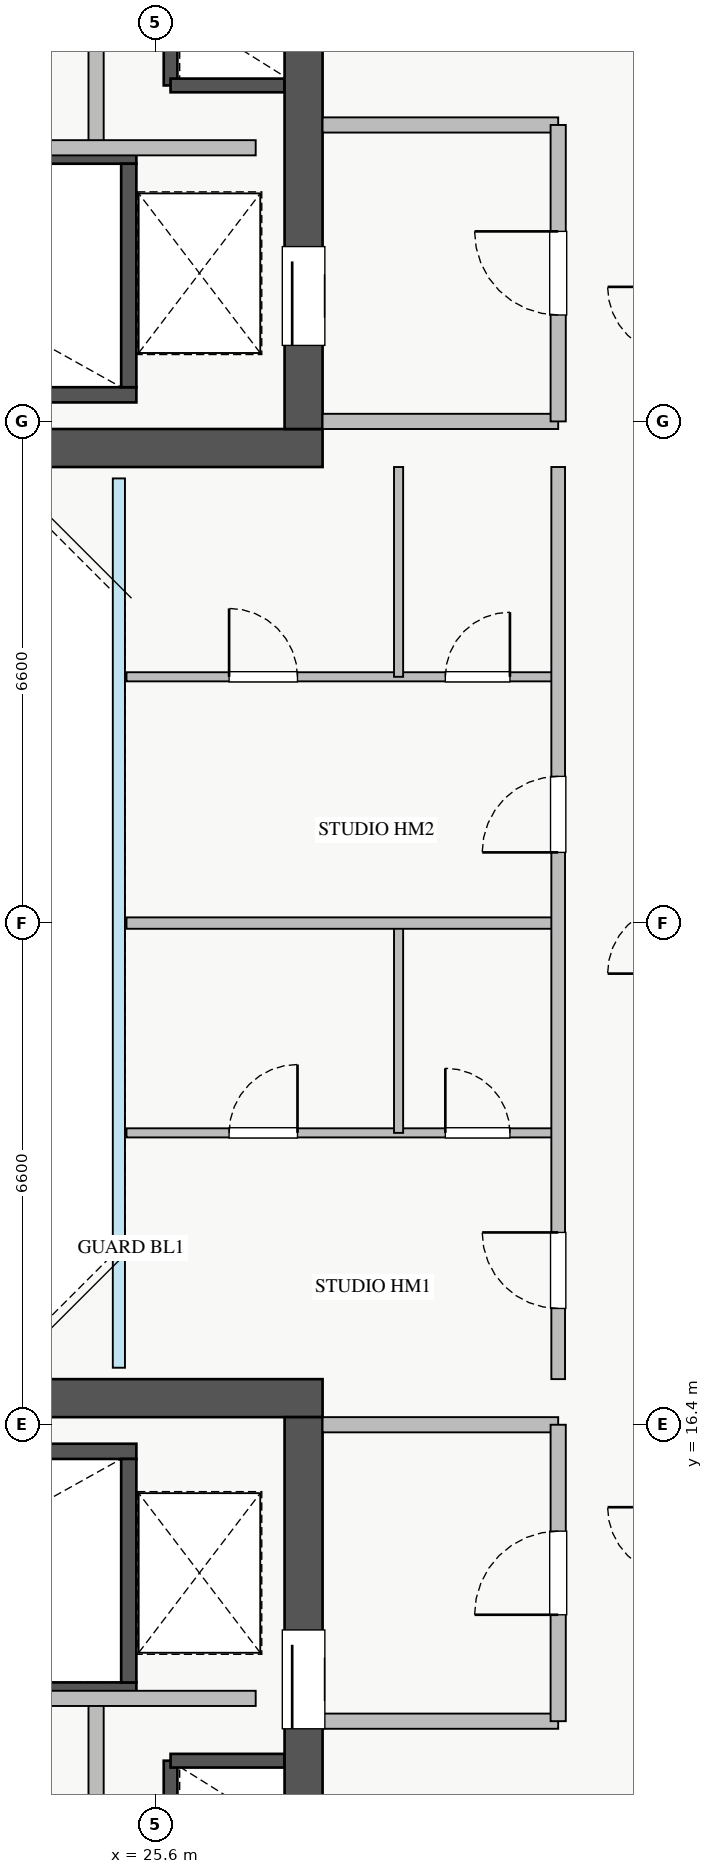
"""IFC4 building model, lengths in metres.
Left out: names, types, materials, properties, quantities, classifications, styles, units other than length and angle.
Written with IfcOpenShell. Run it as: python <this file> out.ifc"""

import sys

from ifc_helpers import new_model, si_unit, direction, frame, frame_2d, origin, place, context, subcontext, project, spatial, rectangle, extrude, source, transform, mapped, element, fill, save


model = new_model("IFC4")
c1 = context("Model", 3, precision=1e-05, world=origin(), true_north=direction((0.0, 1.0)))
c2 = subcontext(c1, "Body", "Model", "MODEL_VIEW")
j1 = project(units=[si_unit("LENGTHUNIT", "METRE"), si_unit("PLANEANGLEUNIT", "RADIAN")], contexts=[c1])
p1 = place(None, origin())
s1 = spatial("IfcSite", under=j1, at=p1, CompositionType="ELEMENT")
p2 = place(p1, origin())
s2 = spatial("IfcBuilding", under=s1, at=p2, CompositionType="ELEMENT")
p3 = place(p2, frame((0.0, 0.0, 200.25)))
s3 = spatial("IfcBuildingStorey", under=s2, at=p3, CompositionType="ELEMENT", Elevation=200.25)
p4 = place(p3, frame((25.8, 34.02, 0.0), z_axis=(0.0, 0.0, 1.0), x_axis=(0.0, 1.0, 0.0)))
e1 = element("IfcWall", 1, at=p4, inside=s3, PredefinedType="SHEAR", context=c2, shape_type="SweptSolid", body=[
    extrude(rectangle(XDim=1.06, YDim=0.18, at=frame_2d((0.53, 0.0))), origin(), (0.0, 0.0, 1.0), 3.07),
])
p5 = place(p3, frame((25.8, 34.02, 0.0), z_axis=(0.0, 0.0, 1.0), x_axis=(1.0, 0.0, 0.0)))
e2 = element("IfcWall", 2, at=p5, inside=s3, PredefinedType="SHEAR", context=c2, shape_type="SweptSolid", body=[
    extrude(rectangle(XDim=1.5, YDim=0.18, at=frame_2d((0.75, 0.0))), origin(), (0.0, 0.0, 1.0), 3.07),
])
p6 = place(p3, frame((25.8, 10.92, 0.0), z_axis=(0.0, 0.0, 1.0), x_axis=(0.0, 1.0, 0.0)))
e3 = element("IfcWall", 3, at=p6, inside=s3, PredefinedType="SHEAR", context=c2, shape_type="SweptSolid", body=[
    extrude(rectangle(XDim=1.06, YDim=0.18, at=frame_2d((0.53, 0.0))), origin(), (0.0, 0.0, 1.0), 3.07),
])
p7 = place(p3, frame((25.8, 11.98, 0.0), z_axis=(0.0, 0.0, 1.0), x_axis=(1.0, 0.0, 0.0)))
e4 = element("IfcWall", 4, at=p7, inside=s3, PredefinedType="SHEAR", context=c2, shape_type="SweptSolid", body=[
    extrude(rectangle(XDim=1.5, YDim=0.18, at=frame_2d((0.75, 0.0))), origin(), (0.0, 0.0, 1.0), 3.07),
])
p8 = place(p3, frame((18.2, 29.95, 0.0), z_axis=(0.0, 0.0, 1.0), x_axis=(1.0, 0.0, 0.0)))
e5 = element("IfcWall", 5, at=p8, inside=s3, PredefinedType="SHEAR", context=c2, shape_type="SweptSolid", body=[
    extrude(rectangle(XDim=7.15, YDim=0.2, at=frame_2d((3.575, 0.0))), origin(), (0.0, 0.0, 1.0), 3.25),
])
p9 = place(p3, frame((18.2, 33.09, 0.0), z_axis=(0.0, 0.0, 1.0), x_axis=(1.0, 0.0, 0.0)))
e6 = element("IfcWall", 6, at=p9, inside=s3, PredefinedType="SHEAR", context=c2, shape_type="SweptSolid", body=[
    extrude(rectangle(XDim=7.15, YDim=0.2, at=frame_2d((3.575, 0.0))), origin(), (0.0, 0.0, 1.0), 3.25),
])
p10 = place(p9, frame((0.35, 0.0, 0.0)))
e7 = element("IfcOpeningElement", 7, at=p10, cuts=e6, PredefinedType="OPENING", context=c2, shape_type="SweptSolid", body=[
    extrude(rectangle(XDim=1.1, YDim=2.05, at=frame_2d((0.55, 1.025))), frame((0.0, 0.11, 0.0), z_axis=(0.0, -1.0, 0.0), x_axis=(1.0, 0.0, 0.0)), (0.0, 0.0, 1.0), 0.22),
])
p11 = place(p3, frame((25.25, 30.05, 0.0), z_axis=(0.0, 0.0, 1.0), x_axis=(0.0, 1.0, 0.0)))
e8 = element("IfcWall", 8, at=p11, inside=s3, PredefinedType="SHEAR", context=c2, shape_type="SweptSolid", body=[
    extrude(rectangle(XDim=2.94, YDim=0.2, at=frame_2d((1.47, 0.0))), origin(), (0.0, 0.0, 1.0), 3.25),
])
p12 = place(p3, frame((18.2, 12.91, 0.0), z_axis=(0.0, 0.0, 1.0), x_axis=(1.0, 0.0, 0.0)))
e9 = element("IfcWall", 9, at=p12, inside=s3, PredefinedType="SHEAR", context=c2, shape_type="SweptSolid", body=[
    extrude(rectangle(XDim=7.15, YDim=0.2, at=frame_2d((3.575, 0.0))), origin(), (0.0, 0.0, 1.0), 3.25),
])
p13 = place(p12, frame((0.35, 0.0, 0.0)))
e10 = element("IfcOpeningElement", 10, at=p13, cuts=e9, PredefinedType="OPENING", context=c2, shape_type="SweptSolid", body=[
    extrude(rectangle(XDim=1.1, YDim=2.05, at=frame_2d((0.55, 1.025))), frame((0.0, 0.11, 0.0), z_axis=(0.0, -1.0, 0.0), x_axis=(1.0, 0.0, 0.0)), (0.0, 0.0, 1.0), 0.22),
])
p14 = place(p3, frame((18.2, 16.05, 0.0), z_axis=(0.0, 0.0, 1.0), x_axis=(1.0, 0.0, 0.0)))
e11 = element("IfcWall", 11, at=p14, inside=s3, PredefinedType="SHEAR", context=c2, shape_type="SweptSolid", body=[
    extrude(rectangle(XDim=7.15, YDim=0.2, at=frame_2d((3.575, 0.0))), origin(), (0.0, 0.0, 1.0), 3.25),
])
p15 = place(p3, frame((25.25, 13.01, 0.0), z_axis=(0.0, 0.0, 1.0), x_axis=(0.0, 1.0, 0.0)))
e12 = element("IfcWall", 12, at=p15, inside=s3, PredefinedType="SHEAR", context=c2, shape_type="SweptSolid", body=[
    extrude(rectangle(XDim=2.94, YDim=0.2, at=frame_2d((1.47, 0.0))), origin(), (0.0, 0.0, 1.0), 3.25),
])
p16 = place(p3, frame((10.2, 29.25, 0.0), z_axis=(0.0, 0.0, 1.0), x_axis=(1.0, 0.0, 0.0)))
e13 = element("IfcWall", 13, at=p16, inside=s3, PredefinedType="SHEAR", context=c2, shape_type="SweptSolid", body=[
    extrude(rectangle(XDim=17.6, YDim=0.5, at=frame_2d((8.8, 0.0))), origin(), (0.0, 0.0, 1.0), 3.25),
])
p17 = place(p3, frame((27.55, 29.5, 0.0), z_axis=(0.0, 0.0, 1.0), x_axis=(0.0, 1.0, 0.0)))
e14 = element("IfcWall", 14, at=p17, inside=s3, PredefinedType="SHEAR", context=c2, shape_type="SweptSolid", body=[
    extrude(rectangle(XDim=6.2, YDim=0.5, at=frame_2d((3.1, 0.0))), origin(), (0.0, 0.0, 1.0), 3.25),
])
p18 = place(p17, frame((1.1, 0.0, 0.0)))
e15 = element("IfcOpeningElement", 15, at=p18, cuts=e14, PredefinedType="OPENING", context=c2, shape_type="SweptSolid", body=[
    extrude(rectangle(XDim=1.3, YDim=2.05, at=frame_2d((0.65, 1.025))), frame((0.0, 0.26, 0.0), z_axis=(0.0, -1.0, 0.0), x_axis=(1.0, 0.0, 0.0)), (0.0, 0.0, 1.0), 0.52),
])
p19 = place(p3, frame((10.2, 16.75, 0.0), z_axis=(0.0, 0.0, 1.0), x_axis=(1.0, 0.0, 0.0)))
e16 = element("IfcWall", 16, at=p19, inside=s3, PredefinedType="SHEAR", context=c2, shape_type="SweptSolid", body=[
    extrude(rectangle(XDim=17.6, YDim=0.5, at=frame_2d((8.8, 0.0))), origin(), (0.0, 0.0, 1.0), 3.25),
])
p20 = place(p3, frame((27.55, 10.3, 0.0), z_axis=(0.0, 0.0, 1.0), x_axis=(0.0, 1.0, 0.0)))
e17 = element("IfcWall", 17, at=p20, inside=s3, PredefinedType="SHEAR", context=c2, shape_type="SweptSolid", body=[
    extrude(rectangle(XDim=6.2, YDim=0.5, at=frame_2d((3.1, 0.0))), origin(), (0.0, 0.0, 1.0), 3.25),
])
p21 = place(p20, frame((2.1, 0.0, 0.0)))
e18 = element("IfcOpeningElement", 18, at=p21, cuts=e17, PredefinedType="OPENING", context=c2, shape_type="SweptSolid", body=[
    extrude(rectangle(XDim=1.3, YDim=2.05, at=frame_2d((0.65, 1.025))), frame((0.0, 0.26, 0.0), z_axis=(0.0, -1.0, 0.0), x_axis=(1.0, 0.0, 0.0)), (0.0, 0.0, 1.0), 0.52),
])
p22 = place(p3, frame((27.8, 29.6, 0.0), z_axis=(0.0, 0.0, 1.0), x_axis=(1.0, 0.0, 0.0)))
e19 = element("IfcWall", 19, at=p22, inside=s3, PredefinedType="PARTITIONING", context=c2, shape_type="SweptSolid", body=[
    extrude(rectangle(XDim=3.1, YDim=0.2, at=frame_2d((1.55, 0.0))), origin(), (0.0, 0.0, 1.0), 3.07),
])
p23 = place(p3, frame((27.8, 33.5, 0.0), z_axis=(0.0, 0.0, 1.0), x_axis=(1.0, 0.0, 0.0)))
e20 = element("IfcWall", 20, at=p23, inside=s3, PredefinedType="PARTITIONING", context=c2, shape_type="SweptSolid", body=[
    extrude(rectangle(XDim=3.1, YDim=0.2, at=frame_2d((1.55, 0.0))), origin(), (0.0, 0.0, 1.0), 2.265),
])
p24 = place(p3, frame((30.9, 29.6, 0.0), z_axis=(0.0, 0.0, 1.0), x_axis=(0.0, 1.0, 0.0)))
e21 = element("IfcWall", 21, at=p24, inside=s3, PredefinedType="PARTITIONING", context=c2, shape_type="SweptSolid", body=[
    extrude(rectangle(XDim=3.9, YDim=0.2, at=frame_2d((1.95, 0.0))), origin(), (0.0, 0.0, 1.0), 3.07),
])
p25 = place(p24, frame((1.4, 0.0, 0.0)))
e22 = element("IfcOpeningElement", 22, at=p25, cuts=e21, PredefinedType="OPENING", context=c2, shape_type="SweptSolid", body=[
    extrude(rectangle(XDim=1.1, YDim=2.05, at=frame_2d((0.55, 1.025))), frame((0.0, 0.11, 0.0), z_axis=(0.0, -1.0, 0.0), x_axis=(1.0, 0.0, 0.0)), (0.0, 0.0, 1.0), 0.22),
])
p26 = place(p3, frame((27.8, 16.4, 0.0), z_axis=(0.0, 0.0, 1.0), x_axis=(1.0, 0.0, 0.0)))
e23 = element("IfcWall", 23, at=p26, inside=s3, PredefinedType="PARTITIONING", context=c2, shape_type="SweptSolid", body=[
    extrude(rectangle(XDim=3.1, YDim=0.2, at=frame_2d((1.55, 0.0))), origin(), (0.0, 0.0, 1.0), 3.07),
])
p27 = place(p3, frame((27.8, 12.5, 0.0), z_axis=(0.0, 0.0, 1.0), x_axis=(1.0, 0.0, 0.0)))
e24 = element("IfcWall", 24, at=p27, inside=s3, PredefinedType="PARTITIONING", context=c2, shape_type="SweptSolid", body=[
    extrude(rectangle(XDim=3.1, YDim=0.2, at=frame_2d((1.55, 0.0))), origin(), (0.0, 0.0, 1.0), 2.265),
])
p28 = place(p3, frame((30.9, 12.5, 0.0), z_axis=(0.0, 0.0, 1.0), x_axis=(0.0, 1.0, 0.0)))
e25 = element("IfcWall", 25, at=p28, inside=s3, PredefinedType="PARTITIONING", context=c2, shape_type="SweptSolid", body=[
    extrude(rectangle(XDim=3.9, YDim=0.2, at=frame_2d((1.95, 0.0))), origin(), (0.0, 0.0, 1.0), 3.07),
])
p29 = place(p28, frame((1.4, 0.0, 0.0)))
e26 = element("IfcOpeningElement", 26, at=p29, cuts=e25, PredefinedType="OPENING", context=c2, shape_type="SweptSolid", body=[
    extrude(rectangle(XDim=1.1, YDim=2.05, at=frame_2d((0.55, 1.025))), frame((0.0, 0.11, 0.0), z_axis=(0.0, -1.0, 0.0), x_axis=(1.0, 0.0, 0.0)), (0.0, 0.0, 1.0), 0.22),
])
for number, where, z_axis, x_axis in (
    (27, (24.82, 33.2, 0.0), (0.0, 0.0, 1.0), (0.0, 1.0, 0.0)),
    (28, (24.82, 10.15, 0.0), (0.0, 0.0, 1.0), (0.0, 1.0, 0.0)),
):
    element("IfcWall", number, at=place(p3, frame(where, z_axis=z_axis, x_axis=x_axis)), inside=s3, PredefinedType="PARTITIONING", context=c2, shape_type="SweptSolid", body=[
        extrude(rectangle(XDim=2.65, YDim=0.2, at=frame_2d((1.325, 0.0))), origin(), (0.0, 0.0, 1.0), 3.07),
    ])
for number, where, z_axis, x_axis in (
    (29, (21.75, 33.2, 0.0), (0.0, 0.0, 1.0), (1.0, 0.0, 0.0)),
    (30, (21.75, 12.8, 0.0), (0.0, 0.0, 1.0), (1.0, 0.0, 0.0)),
):
    element("IfcWall", number, at=place(p3, frame(where, z_axis=z_axis, x_axis=x_axis)), inside=s3, PredefinedType="PARTITIONING", context=c2, shape_type="SweptSolid", body=[
        extrude(rectangle(XDim=5.17, YDim=0.2, at=frame_2d((2.585, 0.0))), origin(), (0.0, 0.0, 1.0), 3.07),
    ])
p30 = place(p3, frame((25.22, 20.24, 0.0), z_axis=(0.0, 0.0, 1.0), x_axis=(1.0, 0.0, 0.0)))
e31 = element("IfcWall", 31, at=p30, inside=s3, PredefinedType="PLUMBINGWALL", context=c2, shape_type="SweptSolid", body=[
    extrude(rectangle(XDim=5.68, YDim=0.12, at=frame_2d((2.84, 0.0))), origin(), (0.0, 0.0, 1.0), 2.675),
])
p31 = place(p30, frame((1.35, 0.0, 0.0)))
e32 = element("IfcOpeningElement", 32, at=p31, cuts=e31, PredefinedType="OPENING", context=c2, shape_type="SweptSolid", body=[
    extrude(rectangle(XDim=0.9, YDim=2.05, at=frame_2d((0.45, 1.025))), frame((0.0, 0.07, 0.0), z_axis=(0.0, -1.0, 0.0), x_axis=(1.0, 0.0, 0.0)), (0.0, 0.0, 1.0), 0.14),
])
p32 = place(p30, frame((4.195, 0.0, 0.0)))
e33 = element("IfcOpeningElement", 33, at=p32, cuts=e31, PredefinedType="OPENING", context=c2, shape_type="SweptSolid", body=[
    extrude(rectangle(XDim=0.85, YDim=2.05, at=frame_2d((0.425, 1.025))), frame((0.0, 0.07, 0.0), z_axis=(0.0, -1.0, 0.0), x_axis=(1.0, 0.0, 0.0)), (0.0, 0.0, 1.0), 0.14),
])
p33 = place(p3, frame((28.8, 20.24, 0.0), z_axis=(0.0, 0.0, 1.0), x_axis=(0.0, 1.0, 0.0)))
e34 = element("IfcWall", 34, at=p33, inside=s3, PredefinedType="PLUMBINGWALL", context=c2, shape_type="SweptSolid", body=[
    extrude(rectangle(XDim=2.76, YDim=0.12, at=frame_2d((1.38, 0.0))), origin(), (0.0, 0.0, 1.0), 3.07),
])
p34 = place(p3, frame((25.22, 26.24, 0.0), z_axis=(0.0, 0.0, 1.0), x_axis=(1.0, 0.0, 0.0)))
e35 = element("IfcWall", 35, at=p34, inside=s3, PredefinedType="PLUMBINGWALL", context=c2, shape_type="SweptSolid", body=[
    extrude(rectangle(XDim=5.68, YDim=0.12, at=frame_2d((2.84, 0.0))), origin(), (0.0, 0.0, 1.0), 2.675),
])
p35 = place(p34, frame((1.35, 0.0, 0.0)))
e36 = element("IfcOpeningElement", 36, at=p35, cuts=e35, PredefinedType="OPENING", context=c2, shape_type="SweptSolid", body=[
    extrude(rectangle(XDim=0.9, YDim=2.05, at=frame_2d((0.45, 1.025))), frame((0.0, 0.07, 0.0), z_axis=(0.0, -1.0, 0.0), x_axis=(1.0, 0.0, 0.0)), (0.0, 0.0, 1.0), 0.14),
])
p36 = place(p34, frame((4.195, 0.0, 0.0)))
e37 = element("IfcOpeningElement", 37, at=p36, cuts=e35, PredefinedType="OPENING", context=c2, shape_type="SweptSolid", body=[
    extrude(rectangle(XDim=0.85, YDim=2.05, at=frame_2d((0.425, 1.025))), frame((0.0, 0.07, 0.0), z_axis=(0.0, -1.0, 0.0), x_axis=(1.0, 0.0, 0.0)), (0.0, 0.0, 1.0), 0.14),
])
p37 = place(p3, frame((28.8, 26.24, 0.0), z_axis=(0.0, 0.0, 1.0), x_axis=(0.0, 1.0, 0.0)))
e38 = element("IfcWall", 38, at=p37, inside=s3, PredefinedType="PLUMBINGWALL", context=c2, shape_type="SweptSolid", body=[
    extrude(rectangle(XDim=2.76, YDim=0.12, at=frame_2d((1.38, 0.0))), origin(), (0.0, 0.0, 1.0), 3.07),
])
p38 = place(p3, frame((25.22, 23.0, 0.0), z_axis=(0.0, 0.0, 1.0), x_axis=(1.0, 0.0, 0.0)))
e39 = element("IfcWall", 39, at=p38, inside=s3, PredefinedType="PARTITIONING", context=c2, shape_type="SweptSolid", body=[
    extrude(rectangle(XDim=5.68, YDim=0.15, at=frame_2d((2.84, 0.0))), origin(), (0.0, 0.0, 1.0), 3.07),
])
p39 = place(p3, frame((30.9, 17.0, 0.0), z_axis=(0.0, 0.0, 1.0), x_axis=(0.0, 1.0, 0.0)))
e40 = element("IfcWall", 40, at=p39, inside=s3, PredefinedType="PARTITIONING", context=c2, shape_type="SweptSolid", body=[
    extrude(rectangle(XDim=12.0, YDim=0.18, at=frame_2d((6.0, 0.0))), origin(), (0.0, 0.0, 1.0), 3.07),
])
p40 = place(p39, frame((0.93, 0.0, 0.0)))
e41 = element("IfcOpeningElement", 41, at=p40, cuts=e40, PredefinedType="OPENING", context=c2, shape_type="SweptSolid", body=[
    extrude(rectangle(XDim=1.0, YDim=2.05, at=frame_2d((0.5, 1.025))), frame((0.0, 0.1, 0.0), z_axis=(0.0, -1.0, 0.0), x_axis=(1.0, 0.0, 0.0)), (0.0, 0.0, 1.0), 0.2),
])
p41 = place(p39, frame((6.93, 0.0, 0.0)))
e42 = element("IfcOpeningElement", 42, at=p41, cuts=e40, PredefinedType="OPENING", context=c2, shape_type="SweptSolid", body=[
    extrude(rectangle(XDim=1.0, YDim=2.05, at=frame_2d((0.5, 1.025))), frame((0.0, 0.1, 0.0), z_axis=(0.0, -1.0, 0.0), x_axis=(1.0, 0.0, 0.0)), (0.0, 0.0, 1.0), 0.2),
])
m1 = source(origin(), c2, "Body", "SweptSolid", [
    extrude(rectangle(XDim=1.3, YDim=2.05, at=frame_2d((0.65, 1.025))), frame((0.0, 0.025, 0.0), z_axis=(0.0, -1.0, 0.0), x_axis=(1.0, 0.0, 0.0)), (0.0, 0.0, 1.0), 0.05),
])
p42 = place(p18, origin())
e43 = element("IfcDoor", 43, at=p42, inside=s3, OperationType="SLIDING_TO_LEFT", PredefinedType="DOOR", context=c2, shape_type="MappedRepresentation", body=[
    mapped(m1, transform((0.0, 0.0, 0.0), x_axis=(1.0, 0.0, 0.0), y_axis=(0.0, 1.0, 0.0), z_axis=(0.0, 0.0, 1.0), scale=1.0)),
])
fill(e15, e43)
p43 = place(p21, origin())
e44 = element("IfcDoor", 44, at=p43, inside=s3, OperationType="SLIDING_TO_RIGHT", PredefinedType="DOOR", context=c2, shape_type="MappedRepresentation", body=[
    mapped(m1, transform((0.0, 0.0, 0.0), x_axis=(1.0, 0.0, 0.0), y_axis=(0.0, 1.0, 0.0), z_axis=(0.0, 0.0, 1.0), scale=1.0)),
])
fill(e18, e44)
m2 = source(origin(), c2, "Body", "SweptSolid", [
    extrude(rectangle(XDim=1.1, YDim=2.05, at=frame_2d((0.55, 1.025))), frame((0.0, 0.025, 0.0), z_axis=(0.0, -1.0, 0.0), x_axis=(1.0, 0.0, 0.0)), (0.0, 0.0, 1.0), 0.05),
])
p44 = place(p25, origin())
e45 = element("IfcDoor", 45, at=p44, inside=s3, OperationType="SINGLE_SWING_RIGHT", PredefinedType="DOOR", context=c2, shape_type="MappedRepresentation", body=[
    mapped(m2, transform((0.0, 0.0, 0.0), x_axis=(1.0, 0.0, 0.0), y_axis=(0.0, 1.0, 0.0), z_axis=(0.0, 0.0, 1.0), scale=1.0)),
])
fill(e22, e45)
p45 = place(p29, origin())
e46 = element("IfcDoor", 46, at=p45, inside=s3, OperationType="SINGLE_SWING_LEFT", PredefinedType="DOOR", context=c2, shape_type="MappedRepresentation", body=[
    mapped(m2, transform((0.0, 0.0, 0.0), x_axis=(1.0, 0.0, 0.0), y_axis=(0.0, 1.0, 0.0), z_axis=(0.0, 0.0, 1.0), scale=1.0)),
])
fill(e26, e46)
m3 = source(origin(), c2, "Body", "SweptSolid", [
    extrude(rectangle(XDim=0.9, YDim=2.05, at=frame_2d((0.45, 1.025))), frame((0.0, 0.025, 0.0), z_axis=(0.0, -1.0, 0.0), x_axis=(1.0, 0.0, 0.0)), (0.0, 0.0, 1.0), 0.05),
])
p46 = place(p31, origin())
e47 = element("IfcDoor", 47, at=p46, inside=s3, OperationType="SINGLE_SWING_RIGHT", PredefinedType="DOOR", context=c2, shape_type="MappedRepresentation", body=[
    mapped(m3, transform((0.0, 0.0, 0.0), x_axis=(1.0, 0.0, 0.0), y_axis=(0.0, 1.0, 0.0), z_axis=(0.0, 0.0, 1.0), scale=1.0)),
])
fill(e32, e47)
m4 = source(origin(), c2, "Body", "SweptSolid", [
    extrude(rectangle(XDim=0.85, YDim=2.05, at=frame_2d((0.425, 1.025))), frame((0.0, 0.025, 0.0), z_axis=(0.0, -1.0, 0.0), x_axis=(1.0, 0.0, 0.0)), (0.0, 0.0, 1.0), 0.05),
])
p47 = place(p32, origin())
e48 = element("IfcDoor", 48, at=p47, inside=s3, OperationType="SINGLE_SWING_LEFT", PredefinedType="DOOR", context=c2, shape_type="MappedRepresentation", body=[
    mapped(m4, transform((0.0, 0.0, 0.0), x_axis=(1.0, 0.0, 0.0), y_axis=(0.0, 1.0, 0.0), z_axis=(0.0, 0.0, 1.0), scale=1.0)),
])
fill(e33, e48)
p48 = place(p35, origin())
e49 = element("IfcDoor", 49, at=p48, inside=s3, OperationType="SINGLE_SWING_LEFT", PredefinedType="DOOR", context=c2, shape_type="MappedRepresentation", body=[
    mapped(m3, transform((0.0, 0.0, 0.0), x_axis=(1.0, 0.0, 0.0), y_axis=(0.0, 1.0, 0.0), z_axis=(0.0, 0.0, 1.0), scale=1.0)),
])
fill(e36, e49)
p49 = place(p36, origin())
e50 = element("IfcDoor", 50, at=p49, inside=s3, OperationType="SINGLE_SWING_RIGHT", PredefinedType="DOOR", context=c2, shape_type="MappedRepresentation", body=[
    mapped(m4, transform((0.0, 0.0, 0.0), x_axis=(1.0, 0.0, 0.0), y_axis=(0.0, 1.0, 0.0), z_axis=(0.0, 0.0, 1.0), scale=1.0)),
])
fill(e37, e50)
m5 = source(origin(), c2, "Body", "SweptSolid", [
    extrude(rectangle(XDim=1.0, YDim=2.05, at=frame_2d((0.5, 1.025))), frame((0.0, 0.025, 0.0), z_axis=(0.0, -1.0, 0.0), x_axis=(1.0, 0.0, 0.0)), (0.0, 0.0, 1.0), 0.05),
])
p50 = place(p40, origin())
e51 = element("IfcDoor", 51, at=p50, inside=s3, OperationType="SINGLE_SWING_RIGHT", PredefinedType="DOOR", context=c2, shape_type="MappedRepresentation", body=[
    mapped(m5, transform((0.0, 0.0, 0.0), x_axis=(1.0, 0.0, 0.0), y_axis=(0.0, 1.0, 0.0), z_axis=(0.0, 0.0, 1.0), scale=1.0)),
])
fill(e41, e51)
p51 = place(p41, origin())
e52 = element("IfcDoor", 52, at=p51, inside=s3, OperationType="SINGLE_SWING_LEFT", PredefinedType="DOOR", context=c2, shape_type="MappedRepresentation", body=[
    mapped(m5, transform((0.0, 0.0, 0.0), x_axis=(1.0, 0.0, 0.0), y_axis=(0.0, 1.0, 0.0), z_axis=(0.0, 0.0, 1.0), scale=1.0)),
])
fill(e42, e52)
save(model, sys.argv[1])
